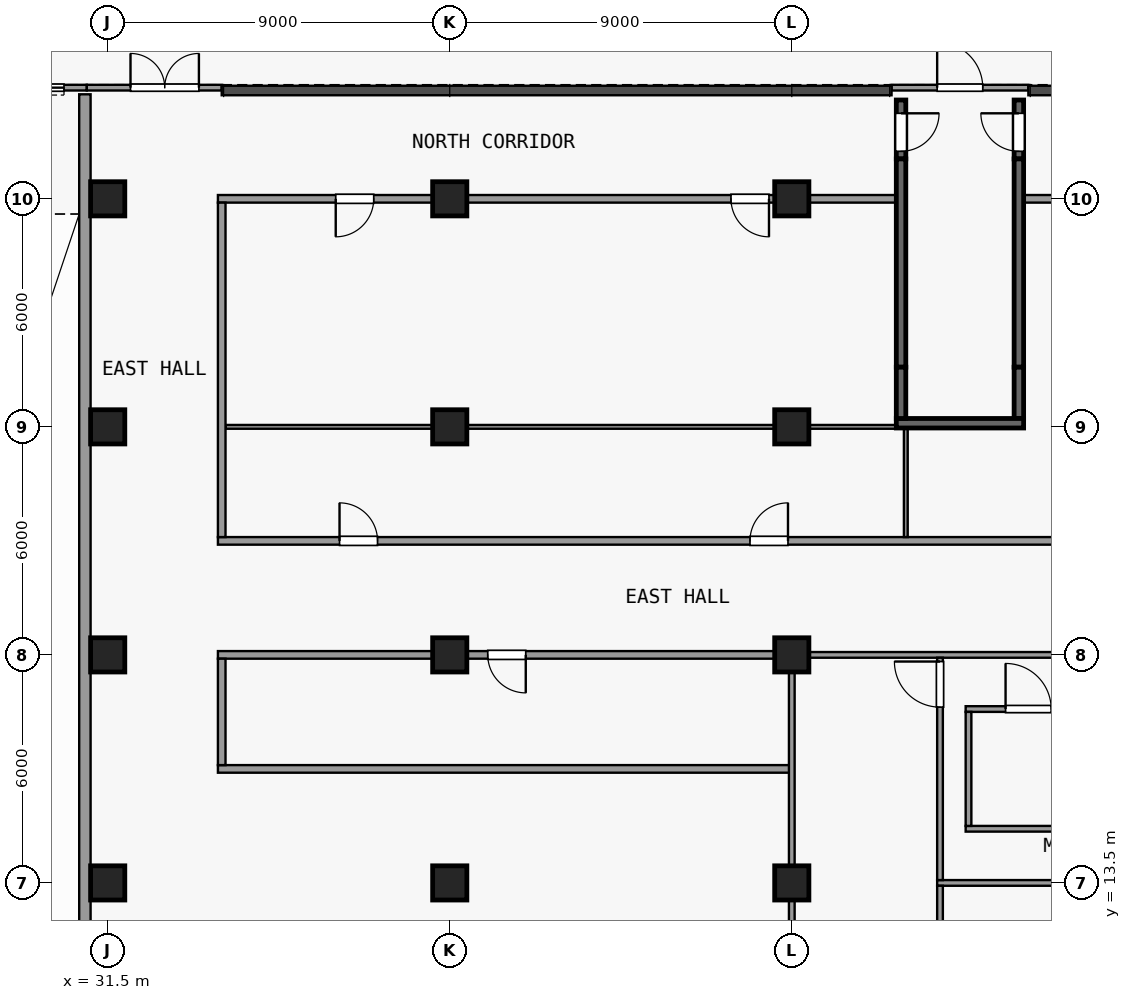
"""IFC4 building model, lengths in metres.
Left out: names, types, materials, properties, quantities, classifications, styles, units other than length and angle.
Written with IfcOpenShell. Run it as: python <this file> out.ifc"""

import sys

from ifc_helpers import new_model, si_unit, direction, frame, frame_2d, origin, origin_2d, place, context, subcontext, project, spatial, rectangle, extrude, element, fill, save


model = new_model("IFC4")
c1 = context("Model", 3, precision=1e-05, world=origin(), true_north=direction((0.0, 1.0)))
c2 = subcontext(c1, "Body", "Model", "MODEL_VIEW")
j1 = project(units=[si_unit("LENGTHUNIT", "METRE"), si_unit("PLANEANGLEUNIT", "RADIAN")], contexts=[c1])
p1 = place(None, origin())
s1 = spatial("IfcSite", under=j1, at=p1, CompositionType="ELEMENT")
p2 = place(p1, origin())
s2 = spatial("IfcBuilding", under=s1, at=p2, CompositionType="ELEMENT")
p3 = place(p2, origin())
s3 = spatial("IfcBuildingStorey", under=s2, at=p3, CompositionType="ELEMENT", Elevation=0.0)
for number, where, z_axis, x_axis in (
    (1, (31.5, 13.5, 0.0), (0.0, 0.0, 1.0), (1.0, 0.0, 0.0)),
    (2, (31.5, 19.5, 0.0), (0.0, 0.0, 1.0), (1.0, 0.0, 0.0)),
    (3, (31.5, 25.5, 0.0), (0.0, 0.0, 1.0), (1.0, 0.0, 0.0)),
    (4, (31.5, 31.5, 0.0), (0.0, 0.0, 1.0), (1.0, 0.0, 0.0)),
    (5, (40.5, 13.5, 0.0), (0.0, 0.0, 1.0), (1.0, 0.0, 0.0)),
    (6, (40.5, 19.5, 0.0), (0.0, 0.0, 1.0), (1.0, 0.0, 0.0)),
    (7, (40.5, 25.5, 0.0), (0.0, 0.0, 1.0), (1.0, 0.0, 0.0)),
    (8, (40.5, 31.5, 0.0), (0.0, 0.0, 1.0), (1.0, 0.0, 0.0)),
    (9, (49.5, 13.5, 0.0), (0.0, 0.0, 1.0), (1.0, 0.0, 0.0)),
    (10, (49.5, 19.5, 0.0), (0.0, 0.0, 1.0), (1.0, 0.0, 0.0)),
    (11, (49.5, 25.5, 0.0), (0.0, 0.0, 1.0), (1.0, 0.0, 0.0)),
    (12, (49.5, 31.5, 0.0), (0.0, 0.0, 1.0), (1.0, 0.0, 0.0)),
):
    element("IfcColumn", number, at=place(p3, frame(where, z_axis=z_axis, x_axis=x_axis)), inside=s3, PredefinedType="COLUMN", context=c2, shape_type="SweptSolid", body=[
        extrude(rectangle(XDim=0.9, YDim=0.9, at=origin_2d()), origin(), (0.0, 0.0, 1.0), 8.0),
    ])
p4 = place(p3, frame((53.325, 13.5, 0.0), z_axis=(0.0, 0.0, 1.0), x_axis=(1.0, 0.0, 0.0)))
e13 = element("IfcWall", 13, at=p4, inside=s3, PredefinedType="PARTITIONING", context=c2, shape_type="SweptSolid", body=[
    extrude(rectangle(XDim=4.725, YDim=0.15, at=frame_2d((2.363, 0.0))), origin(), (0.0, 0.0, 1.0), 7.65),
])
p5 = place(p3, frame((54.075, 14.925, 0.0), z_axis=(0.0, 0.0, 1.0), x_axis=(1.0, 0.0, 0.0)))
e14 = element("IfcWall", 14, at=p5, inside=s3, PredefinedType="PARTITIONING", context=c2, shape_type="SweptSolid", body=[
    extrude(rectangle(XDim=7.15, YDim=0.15, at=frame_2d((3.575, 0.0))), origin(), (0.0, 0.0, 1.0), 7.65),
])
p6 = place(p3, frame((54.075, 18.075, 0.0), z_axis=(0.0, 0.0, 1.0), x_axis=(1.0, 0.0, 0.0)))
e15 = element("IfcWall", 15, at=p6, inside=s3, PredefinedType="PARTITIONING", context=c2, shape_type="SweptSolid", body=[
    extrude(rectangle(XDim=7.15, YDim=0.15, at=frame_2d((3.575, 0.0))), origin(), (0.0, 0.0, 1.0), 7.65),
])
p7 = place(p6, frame((1.05, 0.0, 0.0)))
e16 = element("IfcOpeningElement", 16, at=p7, cuts=e15, PredefinedType="OPENING", context=c2, shape_type="SweptSolid", body=[
    extrude(rectangle(XDim=1.2, YDim=2.1, at=frame_2d((0.6, 1.05))), frame((0.0, 0.085, 0.0), z_axis=(0.0, -1.0, 0.0), x_axis=(1.0, 0.0, 0.0)), (0.0, 0.0, 1.0), 0.17),
])
p8 = place(p3, frame((49.95, 19.5, 0.0), z_axis=(0.0, 0.0, 1.0), x_axis=(1.0, 0.0, 0.0)))
e17 = element("IfcWall", 17, at=p8, inside=s3, PredefinedType="PARTITIONING", context=c2, shape_type="SweptSolid", body=[
    extrude(rectangle(XDim=8.1, YDim=0.15, at=frame_2d((4.05, 0.0))), origin(), (0.0, 0.0, 1.0), 7.65),
])
p9 = place(p3, frame((30.9, 9.6, 0.0), z_axis=(0.0, 0.0, 1.0), x_axis=(0.0, 1.0, 0.0)))
e18 = element("IfcWall", 18, at=p9, inside=s3, PredefinedType="SOLIDWALL", context=c2, shape_type="SweptSolid", body=[
    extrude(rectangle(XDim=24.65, YDim=0.3, at=frame_2d((12.325, 0.0))), origin(), (0.0, 0.0, 1.0), 7.65),
])
p10 = place(p3, frame((49.5, 7.95, 0.0), z_axis=(0.0, 0.0, 1.0), x_axis=(0.0, 1.0, 0.0)))
e19 = element("IfcWall", 19, at=p10, inside=s3, PredefinedType="PARTITIONING", context=c2, shape_type="SweptSolid", body=[
    extrude(rectangle(XDim=5.1, YDim=0.15, at=frame_2d((2.55, 0.0))), origin(), (0.0, 0.0, 1.0), 7.65),
])
p11 = place(p10, frame((1.95, 0.0, 0.0)))
e20 = element("IfcOpeningElement", 20, at=p11, cuts=e19, PredefinedType="OPENING", context=c2, shape_type="SweptSolid", body=[
    extrude(rectangle(XDim=1.2, YDim=2.1, at=frame_2d((0.6, 1.05))), frame((0.0, 0.085, 0.0), z_axis=(0.0, -1.0, 0.0), x_axis=(1.0, 0.0, 0.0)), (0.0, 0.0, 1.0), 0.17),
])
p12 = place(p3, frame((49.5, 13.95, 0.0), z_axis=(0.0, 0.0, 1.0), x_axis=(0.0, 1.0, 0.0)))
e21 = element("IfcWall", 21, at=p12, inside=s3, PredefinedType="PARTITIONING", context=c2, shape_type="SweptSolid", body=[
    extrude(rectangle(XDim=5.1, YDim=0.15, at=frame_2d((2.55, 0.0))), origin(), (0.0, 0.0, 1.0), 7.65),
])
p13 = place(p3, frame((53.4, 7.575, 0.0), z_axis=(0.0, 0.0, 1.0), x_axis=(0.0, 1.0, 0.0)))
e22 = element("IfcWall", 22, at=p13, inside=s3, PredefinedType="PARTITIONING", context=c2, shape_type="SweptSolid", body=[
    extrude(rectangle(XDim=5.85, YDim=0.15, at=frame_2d((2.925, 0.0))), origin(), (0.0, 0.0, 1.0), 7.65),
])
p14 = place(p13, frame((2.025, 0.0, 0.0)))
e23 = element("IfcOpeningElement", 23, at=p14, cuts=e22, PredefinedType="OPENING", context=c2, shape_type="SweptSolid", body=[
    extrude(rectangle(XDim=1.8, YDim=2.1, at=frame_2d((0.9, 1.05))), frame((0.0, 0.085, 0.0), z_axis=(0.0, -1.0, 0.0), x_axis=(1.0, 0.0, 0.0)), (0.0, 0.0, 1.0), 0.17),
])
p15 = place(p3, frame((53.4, 13.575, 0.0), z_axis=(0.0, 0.0, 1.0), x_axis=(0.0, 1.0, 0.0)))
e24 = element("IfcWall", 24, at=p15, inside=s3, PredefinedType="PARTITIONING", context=c2, shape_type="SweptSolid", body=[
    extrude(rectangle(XDim=5.85, YDim=0.15, at=frame_2d((2.925, 0.0))), origin(), (0.0, 0.0, 1.0), 7.65),
])
p16 = place(p15, frame((4.55, 0.0, 0.0)))
e25 = element("IfcOpeningElement", 25, at=p16, cuts=e24, PredefinedType="OPENING", context=c2, shape_type="SweptSolid", body=[
    extrude(rectangle(XDim=1.2, YDim=2.1, at=frame_2d((0.6, 1.05))), frame((0.0, 0.085, 0.0), z_axis=(0.0, -1.0, 0.0), x_axis=(1.0, 0.0, 0.0)), (0.0, 0.0, 1.0), 0.17),
])
p17 = place(p3, frame((54.15, 15.0, 0.0), z_axis=(0.0, 0.0, 1.0), x_axis=(0.0, 1.0, 0.0)))
e26 = element("IfcWall", 26, at=p17, inside=s3, PredefinedType="PARTITIONING", context=c2, shape_type="SweptSolid", body=[
    extrude(rectangle(XDim=3.0, YDim=0.15, at=frame_2d((1.5, 0.0))), origin(), (0.0, 0.0, 1.0), 7.65),
])
p18 = place(p3, frame((52.125, 34.425, 0.0), z_axis=(0.0, 0.0, 1.0), x_axis=(1.0, 0.0, 0.0)))
e27 = element("IfcWall", 27, at=p18, inside=s3, PredefinedType="SOLIDWALL", context=c2, shape_type="SweptSolid", body=[
    extrude(rectangle(XDim=3.6, YDim=0.15, at=frame_2d((1.8, 0.0))), origin(), (0.0, 0.0, 1.0), 7.65),
])
p19 = place(p18, frame((1.2, 0.0, 0.0)))
e28 = element("IfcOpeningElement", 28, at=p19, cuts=e27, PredefinedType="OPENING", context=c2, shape_type="SweptSolid", body=[
    extrude(rectangle(XDim=1.2, YDim=2.4, at=frame_2d((0.6, 1.2))), frame((0.0, 0.085, 0.0), z_axis=(0.0, -1.0, 0.0), x_axis=(1.0, 0.0, 0.0)), (0.0, 0.0, 1.0), 0.17),
])
p20 = place(p3, frame((23.25, 34.425, 0.0), z_axis=(0.0, 0.0, 1.0), x_axis=(1.0, 0.0, 0.0)))
e29 = element("IfcWall", 29, at=p20, inside=s3, PredefinedType="SOLIDWALL", context=c2, shape_type="SweptSolid", body=[
    extrude(rectangle(XDim=7.7, YDim=0.15, at=frame_2d((3.85, 0.0))), origin(), (0.0, 0.0, 1.0), 7.65),
])
p21 = place(p20, frame((0.6, 0.0, 0.0)))
e30 = element("IfcOpeningElement", 30, at=p21, cuts=e29, PredefinedType="OPENING", context=c2, shape_type="SweptSolid", body=[
    extrude(rectangle(XDim=6.5, YDim=4.5, at=frame_2d((3.25, 2.25))), frame((0.0, 0.085, 0.0), z_axis=(0.0, -1.0, 0.0), x_axis=(1.0, 0.0, 0.0)), (0.0, 0.0, 1.0), 0.17),
])
p22 = place(p3, frame((30.95, 34.425, 0.0), z_axis=(0.0, 0.0, 1.0), x_axis=(1.0, 0.0, 0.0)))
e31 = element("IfcWall", 31, at=p22, inside=s3, PredefinedType="SOLIDWALL", context=c2, shape_type="SweptSolid", body=[
    extrude(rectangle(XDim=3.55, YDim=0.15, at=frame_2d((1.775, 0.0))), origin(), (0.0, 0.0, 1.0), 7.65),
])
p23 = place(p22, frame((1.15, 0.0, 0.0)))
e32 = element("IfcOpeningElement", 32, at=p23, cuts=e31, PredefinedType="OPENING", context=c2, shape_type="SweptSolid", body=[
    extrude(rectangle(XDim=1.8, YDim=2.4, at=frame_2d((0.9, 1.2))), frame((0.0, 0.085, 0.0), z_axis=(0.0, -1.0, 0.0), x_axis=(1.0, 0.0, 0.0)), (0.0, 0.0, 1.0), 0.17),
])
p24 = place(p3, frame((52.375, 34.1, 0.0), z_axis=(0.0, 0.0, 1.0), x_axis=(0.0, -1.0, 0.0)))
e33 = element("IfcWall", 33, at=p24, inside=s3, PredefinedType="SHEAR", context=c2, shape_type="SweptSolid", body=[
    extrude(rectangle(XDim=1.55, YDim=0.25, at=frame_2d((0.775, 0.0))), origin(), (0.0, 0.0, 1.0), 7.65),
])
p25 = place(p24, frame((0.35, 0.0, 0.0)))
e34 = element("IfcOpeningElement", 34, at=p25, cuts=e33, PredefinedType="OPENING", context=c2, shape_type="SweptSolid", body=[
    extrude(rectangle(XDim=1.0, YDim=2.1, at=frame_2d((0.5, 1.05))), frame((0.0, 0.135, 0.0), z_axis=(0.0, -1.0, 0.0), x_axis=(1.0, 0.0, 0.0)), (0.0, 0.0, 1.0), 0.27),
])
p26 = place(p3, frame((52.375, 27.07, 0.0), z_axis=(0.0, 0.0, 1.0), x_axis=(0.0, 1.0, 0.0)))
e35 = element("IfcWall", 35, at=p26, inside=s3, PredefinedType="SHEAR", context=c2, shape_type="SweptSolid", body=[
    extrude(rectangle(XDim=5.48, YDim=0.25, at=frame_2d((2.74, 0.0))), origin(), (0.0, 0.0, 1.0), 7.65),
])
p27 = place(p3, frame((52.375, 25.72, 0.0), z_axis=(0.0, 0.0, 1.0), x_axis=(0.0, 1.0, 0.0)))
e36 = element("IfcWall", 36, at=p27, inside=s3, PredefinedType="SHEAR", context=c2, shape_type="SweptSolid", body=[
    extrude(rectangle(XDim=1.35, YDim=0.25, at=frame_2d((0.675, 0.0))), origin(), (0.0, 0.0, 1.0), 7.65),
])
p28 = place(p3, frame((55.475, 32.55, 0.0), z_axis=(0.0, 0.0, 1.0), x_axis=(0.0, 1.0, 0.0)))
e37 = element("IfcWall", 37, at=p28, inside=s3, PredefinedType="SHEAR", context=c2, shape_type="SweptSolid", body=[
    extrude(rectangle(XDim=1.55, YDim=0.25, at=frame_2d((0.775, 0.0))), origin(), (0.0, 0.0, 1.0), 7.65),
])
p29 = place(p28, frame((0.2, 0.0, 0.0)))
e38 = element("IfcOpeningElement", 38, at=p29, cuts=e37, PredefinedType="OPENING", context=c2, shape_type="SweptSolid", body=[
    extrude(rectangle(XDim=1.0, YDim=2.1, at=frame_2d((0.5, 1.05))), frame((0.0, 0.135, 0.0), z_axis=(0.0, -1.0, 0.0), x_axis=(1.0, 0.0, 0.0)), (0.0, 0.0, 1.0), 0.27),
])
p30 = place(p3, frame((55.475, 27.07, 0.0), z_axis=(0.0, 0.0, 1.0), x_axis=(0.0, 1.0, 0.0)))
e39 = element("IfcWall", 39, at=p30, inside=s3, PredefinedType="SHEAR", context=c2, shape_type="SweptSolid", body=[
    extrude(rectangle(XDim=5.48, YDim=0.25, at=frame_2d((2.74, 0.0))), origin(), (0.0, 0.0, 1.0), 7.65),
])
p31 = place(p3, frame((55.475, 25.72, 0.0), z_axis=(0.0, 0.0, 1.0), x_axis=(0.0, 1.0, 0.0)))
e40 = element("IfcWall", 40, at=p31, inside=s3, PredefinedType="SHEAR", context=c2, shape_type="SweptSolid", body=[
    extrude(rectangle(XDim=1.35, YDim=0.25, at=frame_2d((0.675, 0.0))), origin(), (0.0, 0.0, 1.0), 7.65),
])
p32 = place(p3, frame((52.25, 25.595, 0.0), z_axis=(0.0, 0.0, 1.0), x_axis=(1.0, 0.0, 0.0)))
e41 = element("IfcWall", 41, at=p32, inside=s3, PredefinedType="SHEAR", context=c2, shape_type="SweptSolid", body=[
    extrude(rectangle(XDim=3.35, YDim=0.25, at=frame_2d((1.675, 0.0))), origin(), (0.0, 0.0, 1.0), 7.65),
])
p33 = place(p3, frame((34.4, 16.5, 0.0), z_axis=(0.0, 0.0, 1.0), x_axis=(1.0, 0.0, 0.0)))
e42 = element("IfcWall", 42, at=p33, inside=s3, PredefinedType="PARTITIONING", context=c2, shape_type="SweptSolid", body=[
    extrude(rectangle(XDim=15.1, YDim=0.2, at=frame_2d((7.55, 0.0))), origin(), (0.0, 0.0, 1.0), 7.65),
])
p34 = place(p3, frame((34.4, 19.5, 0.0), z_axis=(0.0, 0.0, 1.0), x_axis=(1.0, 0.0, 0.0)))
e43 = element("IfcWall", 43, at=p34, inside=s3, PredefinedType="PARTITIONING", context=c2, shape_type="SweptSolid", body=[
    extrude(rectangle(XDim=15.1, YDim=0.2, at=frame_2d((7.55, 0.0))), origin(), (0.0, 0.0, 1.0), 7.65),
])
p35 = place(p34, frame((7.1, 0.0, 0.0)))
e44 = element("IfcOpeningElement", 44, at=p35, cuts=e43, PredefinedType="OPENING", context=c2, shape_type="SweptSolid", body=[
    extrude(rectangle(XDim=1.0, YDim=2.1, at=frame_2d((0.5, 1.05))), frame((0.0, 0.11, 0.0), z_axis=(0.0, -1.0, 0.0), x_axis=(1.0, 0.0, 0.0)), (0.0, 0.0, 1.0), 0.22),
])
p36 = place(p3, frame((34.4, 22.5, 0.0), z_axis=(0.0, 0.0, 1.0), x_axis=(1.0, 0.0, 0.0)))
e45 = element("IfcWall", 45, at=p36, inside=s3, PredefinedType="PARTITIONING", context=c2, shape_type="SweptSolid", body=[
    extrude(rectangle(XDim=24.2, YDim=0.2, at=frame_2d((12.1, 0.0))), origin(), (0.0, 0.0, 1.0), 7.65),
])
p37 = place(p36, frame((3.2, 0.0, 0.0)))
e46 = element("IfcOpeningElement", 46, at=p37, cuts=e45, PredefinedType="OPENING", context=c2, shape_type="SweptSolid", body=[
    extrude(rectangle(XDim=1.0, YDim=2.1, at=frame_2d((0.5, 1.05))), frame((0.0, 0.11, 0.0), z_axis=(0.0, -1.0, 0.0), x_axis=(1.0, 0.0, 0.0)), (0.0, 0.0, 1.0), 0.22),
])
p38 = place(p36, frame((14.0, 0.0, 0.0)))
e47 = element("IfcOpeningElement", 47, at=p38, cuts=e45, PredefinedType="OPENING", context=c2, shape_type="SweptSolid", body=[
    extrude(rectangle(XDim=1.0, YDim=2.1, at=frame_2d((0.5, 1.05))), frame((0.0, 0.11, 0.0), z_axis=(0.0, -1.0, 0.0), x_axis=(1.0, 0.0, 0.0)), (0.0, 0.0, 1.0), 0.22),
])
p39 = place(p3, frame((34.6, 25.5, 0.0), z_axis=(0.0, 0.0, 1.0), x_axis=(1.0, 0.0, 0.0)))
e48 = element("IfcWall", 48, at=p39, inside=s3, PredefinedType="PARTITIONING", context=c2, shape_type="SweptSolid", body=[
    extrude(rectangle(XDim=17.65, YDim=0.1, at=frame_2d((8.825, 0.0))), origin(), (0.0, 0.0, 1.0), 7.65),
])
p40 = place(p3, frame((34.4, 31.5, 0.0), z_axis=(0.0, 0.0, 1.0), x_axis=(1.0, 0.0, 0.0)))
e49 = element("IfcWall", 49, at=p40, inside=s3, PredefinedType="PARTITIONING", context=c2, shape_type="SweptSolid", body=[
    extrude(rectangle(XDim=17.85, YDim=0.2, at=frame_2d((8.925, 0.0))), origin(), (0.0, 0.0, 1.0), 7.65),
])
p41 = place(p40, frame((3.1, 0.0, 0.0)))
e50 = element("IfcOpeningElement", 50, at=p41, cuts=e49, PredefinedType="OPENING", context=c2, shape_type="SweptSolid", body=[
    extrude(rectangle(XDim=1.0, YDim=2.1, at=frame_2d((0.5, 1.05))), frame((0.0, 0.11, 0.0), z_axis=(0.0, -1.0, 0.0), x_axis=(1.0, 0.0, 0.0)), (0.0, 0.0, 1.0), 0.22),
])
p42 = place(p40, frame((13.5, 0.0, 0.0)))
e51 = element("IfcOpeningElement", 51, at=p42, cuts=e49, PredefinedType="OPENING", context=c2, shape_type="SweptSolid", body=[
    extrude(rectangle(XDim=1.0, YDim=2.1, at=frame_2d((0.5, 1.05))), frame((0.0, 0.11, 0.0), z_axis=(0.0, -1.0, 0.0), x_axis=(1.0, 0.0, 0.0)), (0.0, 0.0, 1.0), 0.22),
])
p43 = place(p3, frame((55.6, 31.5, 0.0), z_axis=(0.0, 0.0, 1.0), x_axis=(1.0, 0.0, 0.0)))
e52 = element("IfcWall", 52, at=p43, inside=s3, PredefinedType="PARTITIONING", context=c2, shape_type="SweptSolid", body=[
    extrude(rectangle(XDim=3.0, YDim=0.2, at=frame_2d((1.5, 0.0))), origin(), (0.0, 0.0, 1.0), 7.65),
])
p44 = place(p3, frame((34.5, 16.6, 0.0), z_axis=(0.0, 0.0, 1.0), x_axis=(0.0, 1.0, 0.0)))
e53 = element("IfcWall", 53, at=p44, inside=s3, PredefinedType="PARTITIONING", context=c2, shape_type="SweptSolid", body=[
    extrude(rectangle(XDim=2.8, YDim=0.2, at=frame_2d((1.4, 0.0))), origin(), (0.0, 0.0, 1.0), 7.65),
])
p45 = place(p3, frame((34.5, 22.6, 0.0), z_axis=(0.0, 0.0, 1.0), x_axis=(0.0, 1.0, 0.0)))
e54 = element("IfcWall", 54, at=p45, inside=s3, PredefinedType="PARTITIONING", context=c2, shape_type="SweptSolid", body=[
    extrude(rectangle(XDim=8.8, YDim=0.2, at=frame_2d((4.4, 0.0))), origin(), (0.0, 0.0, 1.0), 7.65),
])
p46 = place(p3, frame((52.5, 22.6, 0.0), z_axis=(0.0, 0.0, 1.0), x_axis=(0.0, 1.0, 0.0)))
e55 = element("IfcWall", 55, at=p46, inside=s3, PredefinedType="PARTITIONING", context=c2, shape_type="SweptSolid", body=[
    extrude(rectangle(XDim=2.87, YDim=0.1, at=frame_2d((1.435, 0.0))), origin(), (0.0, 0.0, 1.0), 7.65),
])
p47 = place(p7, origin())
e56 = element("IfcDoor", 56, at=p47, inside=s3, OperationType="SINGLE_SWING_LEFT", PredefinedType="DOOR", context=c2, shape_type="SweptSolid", body=[
    extrude(rectangle(XDim=1.2, YDim=2.1, at=frame_2d((0.6, 1.05))), frame((0.0, 0.025, 0.0), z_axis=(0.0, -1.0, 0.0), x_axis=(1.0, 0.0, 0.0)), (0.0, 0.0, 1.0), 0.05),
])
fill(e16, e56)
p48 = place(p16, origin())
e57 = element("IfcDoor", 57, at=p48, inside=s3, OperationType="SINGLE_SWING_RIGHT", PredefinedType="DOOR", context=c2, shape_type="SweptSolid", body=[
    extrude(rectangle(XDim=1.2, YDim=2.1, at=frame_2d((0.6, 1.05))), frame((0.0, 0.025, 0.0), z_axis=(0.0, -1.0, 0.0), x_axis=(1.0, 0.0, 0.0)), (0.0, 0.0, 1.0), 0.05),
])
fill(e25, e57)
p49 = place(p19, origin())
e58 = element("IfcDoor", 58, at=p49, inside=s3, OperationType="SINGLE_SWING_LEFT", PredefinedType="DOOR", context=c2, shape_type="SweptSolid", body=[
    extrude(rectangle(XDim=1.2, YDim=2.4, at=frame_2d((0.6, 1.2))), frame((0.0, 0.025, 0.0), z_axis=(0.0, -1.0, 0.0), x_axis=(1.0, 0.0, 0.0)), (0.0, 0.0, 1.0), 0.05),
])
fill(e28, e58)
p50 = place(p21, origin())
e59 = element("IfcDoor", 59, at=p50, inside=s3, OperationType="ROLLINGUP", PredefinedType="DOOR", context=c2, shape_type="SweptSolid", body=[
    extrude(rectangle(XDim=6.5, YDim=4.5, at=frame_2d((3.25, 2.25))), frame((0.0, 0.025, 0.0), z_axis=(0.0, -1.0, 0.0), x_axis=(1.0, 0.0, 0.0)), (0.0, 0.0, 1.0), 0.05),
])
fill(e30, e59)
p51 = place(p23, origin())
e60 = element("IfcDoor", 60, at=p51, inside=s3, OperationType="DOUBLE_DOOR_SINGLE_SWING", PredefinedType="DOOR", context=c2, shape_type="SweptSolid", body=[
    extrude(rectangle(XDim=1.8, YDim=2.4, at=frame_2d((0.9, 1.2))), frame((0.0, 0.025, 0.0), z_axis=(0.0, -1.0, 0.0), x_axis=(1.0, 0.0, 0.0)), (0.0, 0.0, 1.0), 0.05),
])
fill(e32, e60)
p52 = place(p25, origin())
e61 = element("IfcDoor", 61, at=p52, inside=s3, OperationType="SINGLE_SWING_LEFT", PredefinedType="DOOR", context=c2, shape_type="SweptSolid", body=[
    extrude(rectangle(XDim=1.0, YDim=2.1, at=frame_2d((0.5, 1.05))), frame((0.0, 0.025, 0.0), z_axis=(0.0, -1.0, 0.0), x_axis=(1.0, 0.0, 0.0)), (0.0, 0.0, 1.0), 0.05),
])
fill(e34, e61)
p53 = place(p29, origin())
e62 = element("IfcDoor", 62, at=p53, inside=s3, OperationType="SINGLE_SWING_RIGHT", PredefinedType="DOOR", context=c2, shape_type="SweptSolid", body=[
    extrude(rectangle(XDim=1.0, YDim=2.1, at=frame_2d((0.5, 1.05))), frame((0.0, 0.025, 0.0), z_axis=(0.0, -1.0, 0.0), x_axis=(1.0, 0.0, 0.0)), (0.0, 0.0, 1.0), 0.05),
])
fill(e38, e62)
p54 = place(p35, origin())
e63 = element("IfcDoor", 63, at=p54, inside=s3, OperationType="SINGLE_SWING_RIGHT", PredefinedType="DOOR", context=c2, shape_type="SweptSolid", body=[
    extrude(rectangle(XDim=1.0, YDim=2.1, at=frame_2d((0.5, 1.05))), frame((0.0, 0.025, 0.0), z_axis=(0.0, -1.0, 0.0), x_axis=(1.0, 0.0, 0.0)), (0.0, 0.0, 1.0), 0.05),
])
fill(e44, e63)
p55 = place(p37, origin())
e64 = element("IfcDoor", 64, at=p55, inside=s3, OperationType="SINGLE_SWING_RIGHT", PredefinedType="DOOR", context=c2, shape_type="SweptSolid", body=[
    extrude(rectangle(XDim=1.0, YDim=2.1, at=frame_2d((0.5, 1.05))), frame((0.0, 0.025, 0.0), z_axis=(0.0, -1.0, 0.0), x_axis=(1.0, 0.0, 0.0)), (0.0, 0.0, 1.0), 0.05),
])
fill(e46, e64)
p56 = place(p38, origin())
e65 = element("IfcDoor", 65, at=p56, inside=s3, OperationType="SINGLE_SWING_LEFT", PredefinedType="DOOR", context=c2, shape_type="SweptSolid", body=[
    extrude(rectangle(XDim=1.0, YDim=2.1, at=frame_2d((0.5, 1.05))), frame((0.0, 0.025, 0.0), z_axis=(0.0, -1.0, 0.0), x_axis=(1.0, 0.0, 0.0)), (0.0, 0.0, 1.0), 0.05),
])
fill(e47, e65)
p57 = place(p41, origin())
e66 = element("IfcDoor", 66, at=p57, inside=s3, OperationType="SINGLE_SWING_LEFT", PredefinedType="DOOR", context=c2, shape_type="SweptSolid", body=[
    extrude(rectangle(XDim=1.0, YDim=2.1, at=frame_2d((0.5, 1.05))), frame((0.0, 0.025, 0.0), z_axis=(0.0, -1.0, 0.0), x_axis=(1.0, 0.0, 0.0)), (0.0, 0.0, 1.0), 0.05),
])
fill(e50, e66)
p58 = place(p42, origin())
e67 = element("IfcDoor", 67, at=p58, inside=s3, OperationType="SINGLE_SWING_RIGHT", PredefinedType="DOOR", context=c2, shape_type="SweptSolid", body=[
    extrude(rectangle(XDim=1.0, YDim=2.1, at=frame_2d((0.5, 1.05))), frame((0.0, 0.025, 0.0), z_axis=(0.0, -1.0, 0.0), x_axis=(1.0, 0.0, 0.0)), (0.0, 0.0, 1.0), 0.05),
])
fill(e51, e67)
save(model, sys.argv[1])
